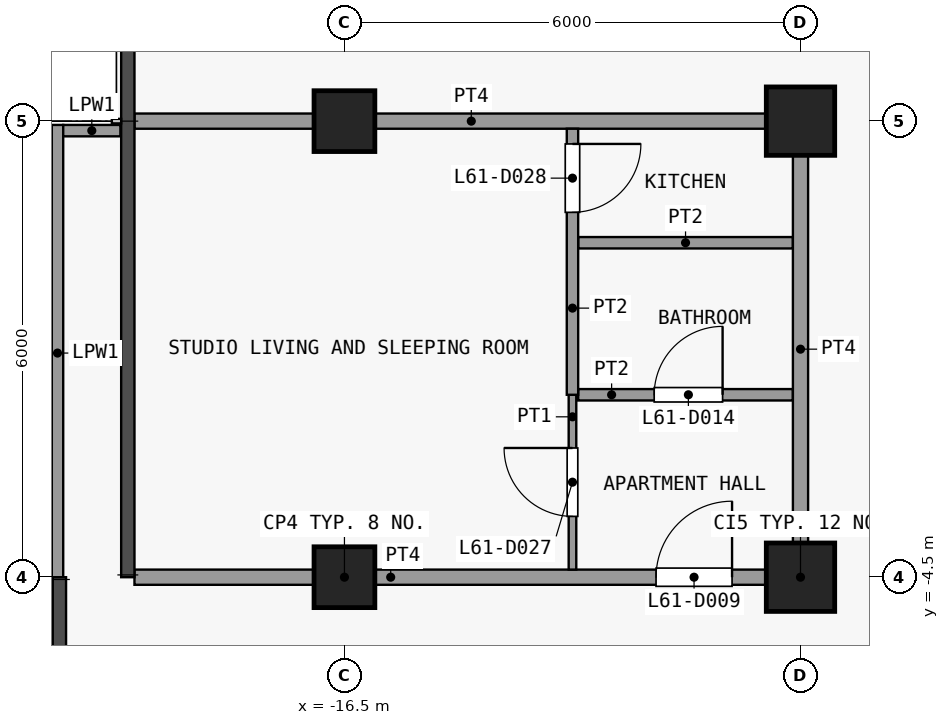
"""IFC4 building model, lengths in metres.
Left out: names, types, materials, properties, quantities, classifications, styles, units other than length and angle.
Written with IfcOpenShell. Run it as: python <this file> out.ifc"""

import sys

from ifc_helpers import new_model, si_unit, direction, frame, frame_2d, origin, origin_2d, place, context, subcontext, project, spatial, rectangle, extrude, element, fill, save


model = new_model("IFC4")
c1 = context("Model", 3, precision=1e-05, world=origin(), true_north=direction((0.0, 1.0)))
c2 = subcontext(c1, "Body", "Model", "MODEL_VIEW")
j1 = project(units=[si_unit("LENGTHUNIT", "METRE"), si_unit("PLANEANGLEUNIT", "RADIAN")], contexts=[c1])
p1 = place(None, origin())
s1 = spatial("IfcSite", under=j1, at=p1, CompositionType="ELEMENT")
p2 = place(p1, origin())
s2 = spatial("IfcBuilding", under=s1, at=p2, CompositionType="ELEMENT")
p3 = place(p2, frame((0.0, 0.0, 241.1)))
s3 = spatial("IfcBuildingStorey", under=s2, at=p3, CompositionType="ELEMENT", Elevation=241.1)
for number, where, z_axis, x_axis in (
    (1, (-16.5, -4.5, 0.0), (0.0, 0.0, 1.0), (1.0, 0.0, 0.0)),
    (2, (-16.5, 1.5, 0.0), (0.0, 0.0, 1.0), (1.0, 0.0, 0.0)),
):
    element("IfcColumn", number, at=place(p3, frame(where, z_axis=z_axis, x_axis=x_axis)), inside=s3, PredefinedType="COLUMN", context=c2, shape_type="SweptSolid", body=[
        extrude(rectangle(XDim=0.8, YDim=0.8, at=origin_2d()), origin(), (0.0, 0.0, 1.0), 3.6),
    ])
for number, where, z_axis, x_axis in (
    (3, (-10.5, -4.5, 0.0), (0.0, 0.0, 1.0), (1.0, 0.0, 0.0)),
    (4, (-10.5, 1.5, 0.0), (0.0, 0.0, 1.0), (1.0, 0.0, 0.0)),
):
    element("IfcColumn", number, at=place(p3, frame(where, z_axis=z_axis, x_axis=x_axis)), inside=s3, PredefinedType="COLUMN", context=c2, shape_type="SweptSolid", body=[
        extrude(rectangle(XDim=0.9, YDim=0.9, at=origin_2d()), origin(), (0.0, 0.0, 1.0), 3.6),
    ])
p4 = place(p3, frame((-20.275, -4.552, 0.0), z_axis=(0.0, 0.0, 1.0), x_axis=(0.0, 1.0, 0.0)))
e5 = element("IfcWall", 5, at=p4, inside=s3, PredefinedType="PARAPET", context=c2, shape_type="SweptSolid", body=[
    extrude(rectangle(XDim=6.002, YDim=0.15, at=frame_2d((3.001, 0.0))), origin(), (0.0, 0.0, 1.0), 1.15),
])
p5 = place(p3, frame((-20.2, 1.375, 0.0), z_axis=(0.0, 0.0, 1.0), x_axis=(1.0, 0.0, 0.0)))
e6 = element("IfcWall", 6, at=p5, inside=s3, PredefinedType="PARAPET", context=c2, shape_type="SweptSolid", body=[
    extrude(rectangle(XDim=0.752, YDim=0.15, at=frame_2d((0.376, 0.0))), origin(), (0.0, 0.0, 1.0), 1.15),
])
p6 = place(p3, frame((-19.262, -4.5, 0.0), z_axis=(0.0, 0.0, 1.0), x_axis=(1.0, 0.0, 0.0)))
e7 = element("IfcWall", 7, at=p6, inside=s3, PredefinedType="PARTITIONING", context=c2, shape_type="SweptSolid", body=[
    extrude(rectangle(XDim=8.863, YDim=0.2, at=frame_2d((4.431, 0.0))), origin(), (0.0, 0.0, 1.0), 3.3),
])
p7 = place(p6, frame((6.862, 0.0, 0.0)))
e8 = element("IfcOpeningElement", 8, at=p7, cuts=e7, PredefinedType="OPENING", context=c2, shape_type="SweptSolid", body=[
    extrude(rectangle(XDim=1.0, YDim=2.1, at=frame_2d((0.5, 1.05))), frame((0.0, 0.11, 0.0), z_axis=(0.0, -1.0, 0.0), x_axis=(1.0, 0.0, 0.0)), (0.0, 0.0, 1.0), 0.22),
])
p8 = place(p3, frame((-13.425, -2.1, 0.0), z_axis=(0.0, 0.0, 1.0), x_axis=(1.0, 0.0, 0.0)))
e9 = element("IfcWall", 9, at=p8, inside=s3, PredefinedType="PARTITIONING", context=c2, shape_type="SweptSolid", body=[
    extrude(rectangle(XDim=2.825, YDim=0.15, at=frame_2d((1.413, 0.0))), origin(), (0.0, 0.0, 1.0), 3.3),
])
p9 = place(p8, frame((1.0, 0.0, 0.0)))
e10 = element("IfcOpeningElement", 10, at=p9, cuts=e9, PredefinedType="OPENING", context=c2, shape_type="SweptSolid", body=[
    extrude(rectangle(XDim=0.9, YDim=2.1, at=frame_2d((0.45, 1.05))), frame((0.0, 0.085, 0.0), z_axis=(0.0, -1.0, 0.0), x_axis=(1.0, 0.0, 0.0)), (0.0, 0.0, 1.0), 0.17),
])
p10 = place(p3, frame((-13.425, -0.1, 0.0), z_axis=(0.0, 0.0, 1.0), x_axis=(1.0, 0.0, 0.0)))
e11 = element("IfcWall", 11, at=p10, inside=s3, PredefinedType="PARTITIONING", context=c2, shape_type="SweptSolid", body=[
    extrude(rectangle(XDim=2.825, YDim=0.15, at=frame_2d((1.413, 0.0))), origin(), (0.0, 0.0, 1.0), 3.3),
])
p11 = place(p3, frame((-19.262, 1.5, 0.0), z_axis=(0.0, 0.0, 1.0), x_axis=(1.0, 0.0, 0.0)))
e12 = element("IfcWall", 12, at=p11, inside=s3, PredefinedType="PARTITIONING", context=c2, shape_type="SweptSolid", body=[
    extrude(rectangle(XDim=8.863, YDim=0.2, at=frame_2d((4.431, 0.0))), origin(), (0.0, 0.0, 1.0), 3.3),
])
p12 = place(p3, frame((-13.5, -4.4, 0.0), z_axis=(0.0, 0.0, 1.0), x_axis=(0.0, 1.0, 0.0)))
e13 = element("IfcWall", 13, at=p12, inside=s3, PredefinedType="PARTITIONING", context=c2, shape_type="SweptSolid", body=[
    extrude(rectangle(XDim=2.3, YDim=0.1, at=frame_2d((1.15, 0.0))), origin(), (0.0, 0.0, 1.0), 3.3),
])
p13 = place(p12, frame((0.7, 0.0, 0.0)))
e14 = element("IfcOpeningElement", 14, at=p13, cuts=e13, PredefinedType="OPENING", context=c2, shape_type="SweptSolid", body=[
    extrude(rectangle(XDim=0.9, YDim=2.1, at=frame_2d((0.45, 1.05))), frame((0.0, 0.06, 0.0), z_axis=(0.0, -1.0, 0.0), x_axis=(1.0, 0.0, 0.0)), (0.0, 0.0, 1.0), 0.12),
])
p14 = place(p3, frame((-13.5, -2.1, 0.0), z_axis=(0.0, 0.0, 1.0), x_axis=(0.0, 1.0, 0.0)))
e15 = element("IfcWall", 15, at=p14, inside=s3, PredefinedType="PARTITIONING", context=c2, shape_type="SweptSolid", body=[
    extrude(rectangle(XDim=3.5, YDim=0.15, at=frame_2d((1.75, 0.0))), origin(), (0.0, 0.0, 1.0), 3.3),
])
p15 = place(p14, frame((2.4, 0.0, 0.0)))
e16 = element("IfcOpeningElement", 16, at=p15, cuts=e15, PredefinedType="OPENING", context=c2, shape_type="SweptSolid", body=[
    extrude(rectangle(XDim=0.9, YDim=2.1, at=frame_2d((0.45, 1.05))), frame((0.0, 0.085, 0.0), z_axis=(0.0, -1.0, 0.0), x_axis=(1.0, 0.0, 0.0)), (0.0, 0.0, 1.0), 0.17),
])
p16 = place(p3, frame((-10.5, -4.4, 0.0), z_axis=(0.0, 0.0, 1.0), x_axis=(0.0, 1.0, 0.0)))
e17 = element("IfcWall", 17, at=p16, inside=s3, PredefinedType="PARTITIONING", context=c2, shape_type="SweptSolid", body=[
    extrude(rectangle(XDim=5.8, YDim=0.2, at=frame_2d((2.9, 0.0))), origin(), (0.0, 0.0, 1.0), 3.3),
])
p17 = place(p7, origin())
e18 = element("IfcDoor", 18, at=p17, inside=s3, OperationType="SINGLE_SWING_LEFT", PredefinedType="DOOR", context=c2, shape_type="SweptSolid", body=[
    extrude(rectangle(XDim=1.0, YDim=2.1, at=frame_2d((0.5, 1.05))), frame((0.0, 0.025, 0.0), z_axis=(0.0, -1.0, 0.0), x_axis=(1.0, 0.0, 0.0)), (0.0, 0.0, 1.0), 0.05),
])
fill(e8, e18)
p18 = place(p9, origin())
e19 = element("IfcDoor", 19, at=p18, inside=s3, OperationType="SINGLE_SWING_LEFT", PredefinedType="DOOR", context=c2, shape_type="SweptSolid", body=[
    extrude(rectangle(XDim=0.9, YDim=2.1, at=frame_2d((0.45, 1.05))), frame((0.0, 0.025, 0.0), z_axis=(0.0, -1.0, 0.0), x_axis=(1.0, 0.0, 0.0)), (0.0, 0.0, 1.0), 0.05),
])
fill(e10, e19)
p19 = place(p13, origin())
e20 = element("IfcDoor", 20, at=p19, inside=s3, OperationType="SINGLE_SWING_LEFT", PredefinedType="DOOR", context=c2, shape_type="SweptSolid", body=[
    extrude(rectangle(XDim=0.9, YDim=2.1, at=frame_2d((0.45, 1.05))), frame((0.0, 0.025, 0.0), z_axis=(0.0, -1.0, 0.0), x_axis=(1.0, 0.0, 0.0)), (0.0, 0.0, 1.0), 0.05),
])
fill(e14, e20)
p20 = place(p15, origin())
e21 = element("IfcDoor", 21, at=p20, inside=s3, OperationType="SINGLE_SWING_RIGHT", PredefinedType="DOOR", context=c2, shape_type="SweptSolid", body=[
    extrude(rectangle(XDim=0.9, YDim=2.1, at=frame_2d((0.45, 1.05))), frame((0.0, 0.025, 0.0), z_axis=(0.0, -1.0, 0.0), x_axis=(1.0, 0.0, 0.0)), (0.0, 0.0, 1.0), 0.05),
])
fill(e16, e21)
save(model, sys.argv[1])
